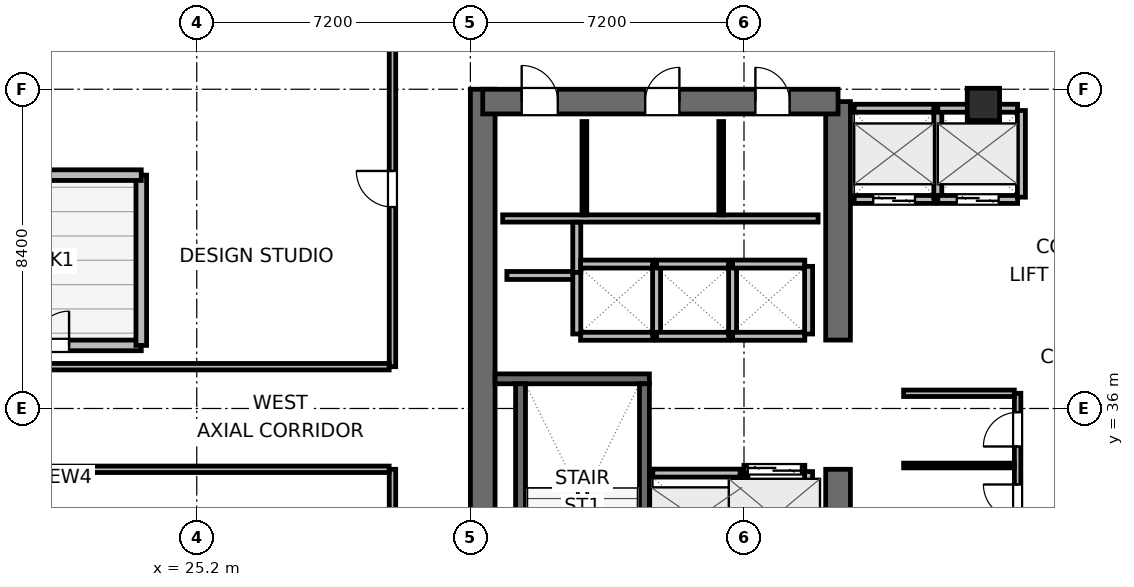
"""IFC4 building model, lengths in metres.
Left out: names, types, materials, properties, quantities, classifications, styles, units other than length and angle.
Written with IfcOpenShell. Run it as: python <this file> out.ifc"""

import sys

from ifc_helpers import new_model, si_unit, direction, frame, frame_2d, origin, origin_2d, place, context, subcontext, project, spatial, rectangle, extrude, element, fill, save


model = new_model("IFC4")
c1 = context("Model", 3, precision=1e-05, world=origin(), true_north=direction((0.0, 1.0)))
c2 = subcontext(c1, "Body", "Model", "MODEL_VIEW")
j1 = project(units=[si_unit("LENGTHUNIT", "METRE"), si_unit("PLANEANGLEUNIT", "RADIAN")], contexts=[c1])
p1 = place(None, origin())
s1 = spatial("IfcSite", under=j1, at=p1, CompositionType="ELEMENT")
p2 = place(p1, origin())
s2 = spatial("IfcBuilding", under=s1, at=p2, CompositionType="ELEMENT")
p3 = place(p2, frame((0.0, 0.0, 181.8)))
s3 = spatial("IfcBuildingStorey", under=s2, at=p3, CompositionType="ELEMENT", Elevation=181.8)
p4 = place(p3, frame((32.725, 27.6, 0.0), z_axis=(0.0, 0.0, 1.0), x_axis=(0.0, 1.0, 0.0)))
e1 = element("IfcWall", 1, at=p4, inside=s3, PredefinedType="SHEAR", context=c2, shape_type="SweptSolid", body=[
    extrude(rectangle(XDim=16.8, YDim=0.65, at=frame_2d((8.4, 0.0))), origin(), (0.0, 0.0, 1.0), 4.5),
])
p5 = place(p3, frame((42.075, 27.925, 0.0), z_axis=(0.0, 0.0, 1.0), x_axis=(0.0, 1.0, 0.0)))
e2 = element("IfcWall", 2, at=p5, inside=s3, PredefinedType="SHEAR", context=c2, shape_type="SweptSolid", body=[
    extrude(rectangle(XDim=6.475, YDim=0.65, at=frame_2d((3.237, 0.0))), origin(), (0.0, 0.0, 1.0), 4.5),
])
p6 = place(p3, frame((42.075, 37.8, 0.0), z_axis=(0.0, 0.0, 1.0), x_axis=(0.0, 1.0, 0.0)))
e3 = element("IfcWall", 3, at=p6, inside=s3, PredefinedType="SHEAR", context=c2, shape_type="SweptSolid", body=[
    extrude(rectangle(XDim=6.275, YDim=0.65, at=frame_2d((3.137, 0.0))), origin(), (0.0, 0.0, 1.0), 4.5),
])
p7 = place(p3, frame((32.725, 44.075, 0.0), z_axis=(0.0, 0.0, 1.0), x_axis=(1.0, 0.0, 0.0)))
e4 = element("IfcWall", 4, at=p7, inside=s3, PredefinedType="SHEAR", context=c2, shape_type="SweptSolid", body=[
    extrude(rectangle(XDim=9.35, YDim=0.65, at=frame_2d((4.675, 0.0))), origin(), (0.0, 0.0, 1.0), 4.5),
])
p8 = place(p7, frame((1.025, 0.0, 0.0)))
e5 = element("IfcOpeningElement", 5, at=p8, cuts=e4, PredefinedType="OPENING", context=c2, shape_type="SweptSolid", body=[
    extrude(rectangle(XDim=0.95, YDim=2.04, at=frame_2d((0.475, 1.02))), frame((0.0, 0.335, 0.0), z_axis=(0.0, -1.0, 0.0), x_axis=(1.0, 0.0, 0.0)), (0.0, 0.0, 1.0), 0.67),
])
p9 = place(p7, frame((4.275, 0.0, 0.0)))
e6 = element("IfcOpeningElement", 6, at=p9, cuts=e4, PredefinedType="OPENING", context=c2, shape_type="SweptSolid", body=[
    extrude(rectangle(XDim=0.9, YDim=2.02, at=frame_2d((0.45, 1.01))), frame((0.0, 0.335, 0.0), z_axis=(0.0, -1.0, 0.0), x_axis=(1.0, 0.0, 0.0)), (0.0, 0.0, 1.0), 0.67),
])
p10 = place(p7, frame((7.175, 0.0, 0.0)))
e7 = element("IfcOpeningElement", 7, at=p10, cuts=e4, PredefinedType="OPENING", context=c2, shape_type="SweptSolid", body=[
    extrude(rectangle(XDim=0.9, YDim=2.02, at=frame_2d((0.45, 1.01))), frame((0.0, 0.335, 0.0), z_axis=(0.0, -1.0, 0.0), x_axis=(1.0, 0.0, 0.0)), (0.0, 0.0, 1.0), 0.67),
])
p11 = place(p3, frame((33.05, 36.78, 0.0), z_axis=(0.0, 0.0, 1.0), x_axis=(1.0, 0.0, 0.0)))
e8 = element("IfcWall", 8, at=p11, inside=s3, PredefinedType="SHEAR", context=c2, shape_type="SweptSolid", body=[
    extrude(rectangle(XDim=4.06, YDim=0.26, at=frame_2d((2.03, 0.0))), origin(), (0.0, 0.0, 1.0), 4.5),
])
p12 = place(p3, frame((33.72, 29.05, 0.0), z_axis=(0.0, 0.0, 1.0), x_axis=(0.0, 1.0, 0.0)))
e9 = element("IfcWall", 9, at=p12, inside=s3, PredefinedType="SHEAR", context=c2, shape_type="SweptSolid", body=[
    extrude(rectangle(XDim=7.6, YDim=0.26, at=frame_2d((3.8, 0.0))), origin(), (0.0, 0.0, 1.0), 4.5),
])
p13 = place(p3, frame((36.98, 29.05, 0.0), z_axis=(0.0, 0.0, 1.0), x_axis=(0.0, 1.0, 0.0)))
e10 = element("IfcWall", 10, at=p13, inside=s3, PredefinedType="SHEAR", context=c2, shape_type="SweptSolid", body=[
    extrude(rectangle(XDim=7.6, YDim=0.26, at=frame_2d((3.8, 0.0))), origin(), (0.0, 0.0, 1.0), 4.5),
])
p14 = place(p13, frame((0.3, 0.0, 0.0)))
e11 = element("IfcOpeningElement", 11, at=p14, cuts=e10, PredefinedType="OPENING", context=c2, shape_type="SweptSolid", body=[
    extrude(rectangle(XDim=1.0, YDim=2.04, at=frame_2d((0.5, 1.02))), frame((0.0, 0.14, 0.0), z_axis=(0.0, -1.0, 0.0), x_axis=(1.0, 0.0, 0.0)), (0.0, 0.0, 1.0), 0.28),
])
p15 = place(p3, frame((45.9, 44.0, 0.0), z_axis=(0.0, 0.0, 1.0), x_axis=(1.0, 0.0, 0.0)))
e12 = element("IfcColumn", 12, at=p15, inside=s3, PredefinedType="COLUMN", context=c2, shape_type="SweptSolid", body=[
    extrude(rectangle(XDim=0.85, YDim=0.85, at=origin_2d()), origin(), (0.0, 0.0, 1.0), 4.5),
])
p16 = place(p3, frame((18.14, 37.66, 0.0), z_axis=(0.0, 0.0, 1.0), x_axis=(1.0, 0.0, 0.0)))
e13 = element("IfcWall", 13, at=p16, inside=s3, PredefinedType="SOLIDWALL", context=c2, shape_type="SweptSolid", body=[
    extrude(rectangle(XDim=5.6, YDim=0.28, at=frame_2d((2.8, 0.0))), origin(), (0.0, 0.0, 1.0), 3.716),
])
p17 = place(p16, frame((1.9, 0.0, 0.0)))
e14 = element("IfcOpeningElement", 14, at=p17, cuts=e13, PredefinedType="OPENING", context=c2, shape_type="SweptSolid", body=[
    extrude(rectangle(XDim=1.8, YDim=2.1, at=frame_2d((0.9, 1.05))), frame((0.0, 0.15, 0.0), z_axis=(0.0, -1.0, 0.0), x_axis=(1.0, 0.0, 0.0)), (0.0, 0.0, 1.0), 0.3),
])
p18 = place(p3, frame((23.74, 37.66, 0.0), z_axis=(0.0, 0.0, 1.0), x_axis=(0.0, 1.0, 0.0)))
e15 = element("IfcWall", 15, at=p18, inside=s3, PredefinedType="SOLIDWALL", context=c2, shape_type="SweptSolid", body=[
    extrude(rectangle(XDim=4.48, YDim=0.28, at=frame_2d((2.24, 0.0))), origin(), (0.0, 0.0, 1.0), 3.848),
])
p19 = place(p3, frame((23.74, 42.14, 0.0), z_axis=(0.0, 0.0, 1.0), x_axis=(-1.0, 0.0, 0.0)))
e16 = element("IfcWall", 16, at=p19, inside=s3, PredefinedType="SOLIDWALL", context=c2, shape_type="SweptSolid", body=[
    extrude(rectangle(XDim=5.6, YDim=0.28, at=frame_2d((2.8, 0.0))), origin(), (0.0, 0.0, 1.0), 3.716),
])
p20 = place(p3, frame((33.25, 41.0, 0.0), z_axis=(0.0, 0.0, 1.0), x_axis=(1.0, 0.0, 0.0)))
e17 = element("IfcWall", 17, at=p20, inside=s3, PredefinedType="PLUMBINGWALL", context=c2, shape_type="SweptSolid", body=[
    extrude(rectangle(XDim=8.3, YDim=0.19, at=frame_2d((4.15, 0.0))), origin(), (0.0, 0.0, 1.0), 4.28),
])
for number, where, z_axis, x_axis in (
    (18, (35.4, 41.095, 0.0), (0.0, 0.0, 1.0), (0.0, 1.0, 0.0)),
    (19, (39.0, 41.095, 0.0), (0.0, 0.0, 1.0), (0.0, 1.0, 0.0)),
):
    element("IfcWall", number, at=place(p3, frame(where, z_axis=z_axis, x_axis=x_axis)), inside=s3, PredefinedType="PARTITIONING", context=c2, shape_type="SweptSolid", body=[
        extrude(rectangle(XDim=2.455, YDim=0.125, at=frame_2d((1.228, 0.0))), origin(), (0.0, 0.0, 1.0), 4.28),
    ])
p21 = place(p3, frame((33.36, 39.5, 0.0), z_axis=(0.0, 0.0, 1.0), x_axis=(1.0, 0.0, 0.0)))
e20 = element("IfcWall", 20, at=p21, inside=s3, PredefinedType="PARTITIONING", context=c2, shape_type="SweptSolid", body=[
    extrude(rectangle(XDim=1.86, YDim=0.21, at=frame_2d((0.93, 0.0))), origin(), (0.0, 0.0, 1.0), 4.28),
])
p22 = place(p3, frame((35.2, 39.58, 0.0), z_axis=(0.0, 0.0, 1.0), x_axis=(0.0, 1.0, 0.0)))
e21 = element("IfcWall", 21, at=p22, inside=s3, PredefinedType="PARTITIONING", context=c2, shape_type="SweptSolid", body=[
    extrude(rectangle(XDim=1.32, YDim=0.21, at=frame_2d((0.66, 0.0))), origin(), (0.0, 0.0, 1.0), 4.28),
])
p23 = place(p3, frame((37.2, 34.3, 0.0), z_axis=(0.0, 0.0, 1.0), x_axis=(1.0, 0.0, 0.0)))
e22 = element("IfcWall", 22, at=p23, inside=s3, PredefinedType="PARTITIONING", context=c2, shape_type="SweptSolid", body=[
    extrude(rectangle(XDim=2.3, YDim=0.21, at=frame_2d((1.15, 0.0))), origin(), (0.0, 0.0, 1.0), 4.28),
])
p24 = place(p3, frame((39.6, 31.96, 0.0), z_axis=(0.0, 0.0, 1.0), x_axis=(0.0, 1.0, 0.0)))
e23 = element("IfcWall", 23, at=p24, inside=s3, PredefinedType="PARTITIONING", context=c2, shape_type="SweptSolid", body=[
    extrude(rectangle(XDim=2.28, YDim=0.21, at=frame_2d((1.14, 0.0))), origin(), (0.0, 0.0, 1.0), 4.28),
])
p25 = place(p3, frame((39.6, 34.4, 0.0), z_axis=(0.0, 0.0, 1.0), x_axis=(1.0, 0.0, 0.0)))
e24 = element("IfcWall", 24, at=p25, inside=s3, PredefinedType="PARTITIONING", context=c2, shape_type="SweptSolid", body=[
    extrude(rectangle(XDim=1.6, YDim=0.21, at=frame_2d((0.8, 0.0))), origin(), (0.0, 0.0, 1.0), 4.28),
])
p26 = place(p25, frame((0.1, 0.0, 0.0)))
e25 = element("IfcOpeningElement", 25, at=p26, cuts=e24, PredefinedType="OPENING", context=c2, shape_type="SweptSolid", body=[
    extrude(rectangle(XDim=1.4, YDim=2.06, at=frame_2d((0.7, 1.03))), frame((0.0, 0.115, 0.0), z_axis=(0.0, -1.0, 0.0), x_axis=(1.0, 0.0, 0.0)), (0.0, 0.0, 1.0), 0.23),
])
p27 = place(p3, frame((41.3, 31.96, 0.0), z_axis=(0.0, 0.0, 1.0), x_axis=(0.0, 1.0, 0.0)))
e26 = element("IfcWall", 26, at=p27, inside=s3, PredefinedType="PARTITIONING", context=c2, shape_type="SweptSolid", body=[
    extrude(rectangle(XDim=2.38, YDim=0.21, at=frame_2d((1.19, 0.0))), origin(), (0.0, 0.0, 1.0), 4.28),
])
p28 = place(p3, frame((42.5, 41.5, 0.0), z_axis=(0.0, 0.0, 1.0), x_axis=(1.0, 0.0, 0.0)))
e27 = element("IfcWall", 27, at=p28, inside=s3, PredefinedType="PARTITIONING", context=c2, shape_type="SweptSolid", body=[
    extrude(rectangle(XDim=2.1, YDim=0.21, at=frame_2d((1.05, 0.0))), origin(), (0.0, 0.0, 1.0), 4.28),
])
p29 = place(p28, frame((0.5, 0.0, 0.0)))
e28 = element("IfcOpeningElement", 28, at=p29, cuts=e27, PredefinedType="OPENING", context=c2, shape_type="SweptSolid", body=[
    extrude(rectangle(XDim=1.1, YDim=2.04, at=frame_2d((0.55, 1.02))), frame((0.0, 0.115, 0.0), z_axis=(0.0, -1.0, 0.0), x_axis=(1.0, 0.0, 0.0)), (0.0, 0.0, 1.0), 0.23),
])
p30 = place(p3, frame((42.5, 43.9, 0.0), z_axis=(0.0, 0.0, 1.0), x_axis=(1.0, 0.0, 0.0)))
e29 = element("IfcWall", 29, at=p30, inside=s3, PredefinedType="PARTITIONING", context=c2, shape_type="SweptSolid", body=[
    extrude(rectangle(XDim=2.1, YDim=0.21, at=frame_2d((1.05, 0.0))), origin(), (0.0, 0.0, 1.0), 3.365),
])
p31 = place(p3, frame((44.7, 41.56, 0.0), z_axis=(0.0, 0.0, 1.0), x_axis=(0.0, 1.0, 0.0)))
e30 = element("IfcWall", 30, at=p31, inside=s3, PredefinedType="PARTITIONING", context=c2, shape_type="SweptSolid", body=[
    extrude(rectangle(XDim=2.28, YDim=0.21, at=frame_2d((1.14, 0.0))), origin(), (0.0, 0.0, 1.0), 4.28),
])
p32 = place(p3, frame((44.7, 41.5, 0.0), z_axis=(0.0, 0.0, 1.0), x_axis=(1.0, 0.0, 0.0)))
e31 = element("IfcWall", 31, at=p32, inside=s3, PredefinedType="PARTITIONING", context=c2, shape_type="SweptSolid", body=[
    extrude(rectangle(XDim=2.1, YDim=0.21, at=frame_2d((1.05, 0.0))), origin(), (0.0, 0.0, 1.0), 4.28),
])
p33 = place(p32, frame((0.5, 0.0, 0.0)))
e32 = element("IfcOpeningElement", 32, at=p33, cuts=e31, PredefinedType="OPENING", context=c2, shape_type="SweptSolid", body=[
    extrude(rectangle(XDim=1.1, YDim=2.04, at=frame_2d((0.55, 1.02))), frame((0.0, 0.115, 0.0), z_axis=(0.0, -1.0, 0.0), x_axis=(1.0, 0.0, 0.0)), (0.0, 0.0, 1.0), 0.23),
])
p34 = place(p3, frame((44.7, 43.9, 0.0), z_axis=(0.0, 0.0, 1.0), x_axis=(1.0, 0.0, 0.0)))
e33 = element("IfcWall", 33, at=p34, inside=s3, PredefinedType="PARTITIONING", context=c2, shape_type="SweptSolid", body=[
    extrude(rectangle(XDim=2.1, YDim=0.21, at=frame_2d((1.05, 0.0))), origin(), (0.0, 0.0, 1.0), 3.365),
])
p35 = place(p3, frame((46.9, 41.56, 0.0), z_axis=(0.0, 0.0, 1.0), x_axis=(0.0, 1.0, 0.0)))
e34 = element("IfcWall", 34, at=p35, inside=s3, PredefinedType="PARTITIONING", context=c2, shape_type="SweptSolid", body=[
    extrude(rectangle(XDim=2.28, YDim=0.21, at=frame_2d((1.14, 0.0))), origin(), (0.0, 0.0, 1.0), 4.28),
])
for number, where, z_axis, x_axis in (
    (35, (35.3, 37.9, 0.0), (0.0, 0.0, 1.0), (1.0, 0.0, 0.0)),
    (36, (35.3, 39.8, 0.0), (0.0, 0.0, 1.0), (1.0, 0.0, 0.0)),
):
    element("IfcWall", number, at=place(p3, frame(where, z_axis=z_axis, x_axis=x_axis)), inside=s3, PredefinedType="PARTITIONING", context=c2, shape_type="SweptSolid", body=[
        extrude(rectangle(XDim=1.9, YDim=0.21, at=frame_2d((0.95, 0.0))), origin(), (0.0, 0.0, 1.0), 4.28),
    ])
p36 = place(p3, frame((35.2, 37.96, 0.0), z_axis=(0.0, 0.0, 1.0), x_axis=(0.0, 1.0, 0.0)))
e37 = element("IfcWall", 37, at=p36, inside=s3, PredefinedType="PARTITIONING", context=c2, shape_type="SweptSolid", body=[
    extrude(rectangle(XDim=1.62, YDim=0.21, at=frame_2d((0.81, 0.0))), origin(), (0.0, 0.0, 1.0), 4.28),
])
p37 = place(p3, frame((37.3, 37.96, 0.0), z_axis=(0.0, 0.0, 1.0), x_axis=(0.0, 1.0, 0.0)))
e38 = element("IfcWall", 38, at=p37, inside=s3, PredefinedType="PARTITIONING", context=c2, shape_type="SweptSolid", body=[
    extrude(rectangle(XDim=1.78, YDim=0.21, at=frame_2d((0.89, 0.0))), origin(), (0.0, 0.0, 1.0), 4.28),
])
for number, where, z_axis, x_axis in (
    (39, (37.3, 37.9, 0.0), (0.0, 0.0, 1.0), (1.0, 0.0, 0.0)),
    (40, (37.3, 39.8, 0.0), (0.0, 0.0, 1.0), (1.0, 0.0, 0.0)),
):
    element("IfcWall", number, at=place(p3, frame(where, z_axis=z_axis, x_axis=x_axis)), inside=s3, PredefinedType="PARTITIONING", context=c2, shape_type="SweptSolid", body=[
        extrude(rectangle(XDim=1.9, YDim=0.21, at=frame_2d((0.95, 0.0))), origin(), (0.0, 0.0, 1.0), 4.28),
    ])
p38 = place(p3, frame((39.3, 37.96, 0.0), z_axis=(0.0, 0.0, 1.0), x_axis=(0.0, 1.0, 0.0)))
e41 = element("IfcWall", 41, at=p38, inside=s3, PredefinedType="PARTITIONING", context=c2, shape_type="SweptSolid", body=[
    extrude(rectangle(XDim=1.78, YDim=0.21, at=frame_2d((0.89, 0.0))), origin(), (0.0, 0.0, 1.0), 4.28),
])
for number, where, z_axis, x_axis in (
    (42, (39.3, 37.9, 0.0), (0.0, 0.0, 1.0), (1.0, 0.0, 0.0)),
    (43, (39.3, 39.8, 0.0), (0.0, 0.0, 1.0), (1.0, 0.0, 0.0)),
):
    element("IfcWall", number, at=place(p3, frame(where, z_axis=z_axis, x_axis=x_axis)), inside=s3, PredefinedType="PARTITIONING", context=c2, shape_type="SweptSolid", body=[
        extrude(rectangle(XDim=1.9, YDim=0.21, at=frame_2d((0.95, 0.0))), origin(), (0.0, 0.0, 1.0), 4.28),
    ])
p39 = place(p3, frame((41.3, 37.96, 0.0), z_axis=(0.0, 0.0, 1.0), x_axis=(0.0, 1.0, 0.0)))
e44 = element("IfcWall", 44, at=p39, inside=s3, PredefinedType="PARTITIONING", context=c2, shape_type="SweptSolid", body=[
    extrude(rectangle(XDim=1.78, YDim=0.21, at=frame_2d((0.89, 0.0))), origin(), (0.0, 0.0, 1.0), 4.28),
])
p40 = place(p3, frame((46.8, 32.6, 0.0), z_axis=(0.0, 0.0, 1.0), x_axis=(0.0, 1.0, 0.0)))
e45 = element("IfcWall", 45, at=p40, inside=s3, PredefinedType="PARTITIONING", context=c2, shape_type="SweptSolid", body=[
    extrude(rectangle(XDim=3.8, YDim=0.17, at=frame_2d((1.9, 0.0))), origin(), (0.0, 0.0, 1.0), 4.28),
])
p41 = place(p40, frame((0.5, 0.0, 0.0)))
e46 = element("IfcOpeningElement", 46, at=p41, cuts=e45, PredefinedType="OPENING", context=c2, shape_type="SweptSolid", body=[
    extrude(rectangle(XDim=0.9, YDim=2.02, at=frame_2d((0.45, 1.01))), frame((0.0, 0.095, 0.0), z_axis=(0.0, -1.0, 0.0), x_axis=(1.0, 0.0, 0.0)), (0.0, 0.0, 1.0), 0.19),
])
p42 = place(p40, frame((2.4, 0.0, 0.0)))
e47 = element("IfcOpeningElement", 47, at=p42, cuts=e45, PredefinedType="OPENING", context=c2, shape_type="SweptSolid", body=[
    extrude(rectangle(XDim=0.9, YDim=2.02, at=frame_2d((0.45, 1.01))), frame((0.0, 0.095, 0.0), z_axis=(0.0, -1.0, 0.0), x_axis=(1.0, 0.0, 0.0)), (0.0, 0.0, 1.0), 0.19),
])
p43 = place(p3, frame((43.8, 36.4, 0.0), z_axis=(0.0, 0.0, 1.0), x_axis=(1.0, 0.0, 0.0)))
e48 = element("IfcWall", 48, at=p43, inside=s3, PredefinedType="PARTITIONING", context=c2, shape_type="SweptSolid", body=[
    extrude(rectangle(XDim=2.913, YDim=0.17, at=frame_2d((1.457, 0.0))), origin(), (0.0, 0.0, 1.0), 4.28),
])
p44 = place(p3, frame((43.8, 34.5, 0.0), z_axis=(0.0, 0.0, 1.0), x_axis=(1.0, 0.0, 0.0)))
e49 = element("IfcWall", 49, at=p44, inside=s3, PredefinedType="PARTITIONING", context=c2, shape_type="SweptSolid", body=[
    extrude(rectangle(XDim=2.913, YDim=0.125, at=frame_2d((1.457, 0.0))), origin(), (0.0, 0.0, 1.0), 4.28),
])
p45 = place(p3, frame((30.35, 25.637, 0.0), z_axis=(0.0, 0.0, 1.0), x_axis=(0.0, 1.0, 0.0)))
e50 = element("IfcWall", 50, at=p45, inside=s3, PredefinedType="PARTITIONING", context=c2, shape_type="SweptSolid", body=[
    extrude(rectangle(XDim=8.763, YDim=0.17, at=frame_2d((4.381, 0.0))), origin(), (0.0, 0.0, 1.0), 4.28),
])
p46 = place(p45, frame((3.863, 0.0, 0.0)))
e51 = element("IfcOpeningElement", 51, at=p46, cuts=e50, PredefinedType="OPENING", context=c2, shape_type="SweptSolid", body=[
    extrude(rectangle(XDim=0.95, YDim=2.04, at=frame_2d((0.475, 1.02))), frame((0.0, 0.095, 0.0), z_axis=(0.0, -1.0, 0.0), x_axis=(1.0, 0.0, 0.0)), (0.0, 0.0, 1.0), 0.19),
])
p47 = place(p3, frame((30.35, 37.1, 0.0), z_axis=(0.0, 0.0, 1.0), x_axis=(0.0, 1.0, 0.0)))
e52 = element("IfcWall", 52, at=p47, inside=s3, PredefinedType="PARTITIONING", context=c2, shape_type="SweptSolid", body=[
    extrude(rectangle(XDim=9.263, YDim=0.17, at=frame_2d((4.631, 0.0))), origin(), (0.0, 0.0, 1.0), 4.28),
])
p48 = place(p47, frame((4.2, 0.0, 0.0)))
e53 = element("IfcOpeningElement", 53, at=p48, cuts=e52, PredefinedType="OPENING", context=c2, shape_type="SweptSolid", body=[
    extrude(rectangle(XDim=0.95, YDim=2.04, at=frame_2d((0.475, 1.02))), frame((0.0, 0.095, 0.0), z_axis=(0.0, -1.0, 0.0), x_axis=(1.0, 0.0, 0.0)), (0.0, 0.0, 1.0), 0.19),
])
p49 = place(p3, frame((20.24, 34.4, 0.0), z_axis=(0.0, 0.0, 1.0), x_axis=(1.0, 0.0, 0.0)))
e54 = element("IfcWall", 54, at=p49, inside=s3, PredefinedType="PARTITIONING", context=c2, shape_type="SweptSolid", body=[
    extrude(rectangle(XDim=10.023, YDim=0.17, at=frame_2d((5.011, 0.0))), origin(), (0.0, 0.0, 1.0), 4.28),
])
p50 = place(p3, frame((18.275, 37.1, 0.0), z_axis=(0.0, 0.0, 1.0), x_axis=(1.0, 0.0, 0.0)))
e55 = element("IfcWall", 55, at=p50, inside=s3, PredefinedType="PARTITIONING", context=c2, shape_type="SweptSolid", body=[
    extrude(rectangle(XDim=11.988, YDim=0.17, at=frame_2d((5.994, 0.0))), origin(), (0.0, 0.0, 1.0), 4.28),
])
p51 = place(p17, origin())
e56 = element("IfcDoor", 56, at=p51, inside=s3, OperationType="DOUBLE_DOOR_SINGLE_SWING", PredefinedType="DOOR", context=c2, shape_type="SweptSolid", body=[
    extrude(rectangle(XDim=1.8, YDim=2.1, at=frame_2d((0.9, 1.05))), frame((0.0, 0.025, 0.0), z_axis=(0.0, -1.0, 0.0), x_axis=(1.0, 0.0, 0.0)), (0.0, 0.0, 1.0), 0.05),
])
fill(e14, e56)
p52 = place(p26, origin())
e57 = element("IfcDoor", 57, at=p52, inside=s3, OperationType="DOUBLE_DOOR_SLIDING", PredefinedType="DOOR", context=c2, shape_type="SweptSolid", body=[
    extrude(rectangle(XDim=1.4, YDim=2.06, at=frame_2d((0.7, 1.03))), frame((0.0, 0.025, 0.0), z_axis=(0.0, -1.0, 0.0), x_axis=(1.0, 0.0, 0.0)), (0.0, 0.0, 1.0), 0.05),
])
fill(e25, e57)
p53 = place(p29, origin())
e58 = element("IfcDoor", 58, at=p53, inside=s3, OperationType="DOUBLE_DOOR_SLIDING", PredefinedType="DOOR", context=c2, shape_type="SweptSolid", body=[
    extrude(rectangle(XDim=1.1, YDim=2.04, at=frame_2d((0.55, 1.02))), frame((0.0, 0.025, 0.0), z_axis=(0.0, -1.0, 0.0), x_axis=(1.0, 0.0, 0.0)), (0.0, 0.0, 1.0), 0.05),
])
fill(e28, e58)
p54 = place(p33, origin())
e59 = element("IfcDoor", 59, at=p54, inside=s3, OperationType="DOUBLE_DOOR_SLIDING", PredefinedType="DOOR", context=c2, shape_type="SweptSolid", body=[
    extrude(rectangle(XDim=1.1, YDim=2.04, at=frame_2d((0.55, 1.02))), frame((0.0, 0.025, 0.0), z_axis=(0.0, -1.0, 0.0), x_axis=(1.0, 0.0, 0.0)), (0.0, 0.0, 1.0), 0.05),
])
fill(e32, e59)
p55 = place(p8, origin())
e60 = element("IfcDoor", 60, at=p55, inside=s3, OperationType="SINGLE_SWING_LEFT", PredefinedType="DOOR", context=c2, shape_type="SweptSolid", body=[
    extrude(rectangle(XDim=0.95, YDim=2.04, at=frame_2d((0.475, 1.02))), frame((0.0, 0.025, 0.0), z_axis=(0.0, -1.0, 0.0), x_axis=(1.0, 0.0, 0.0)), (0.0, 0.0, 1.0), 0.05),
])
fill(e5, e60)
p56 = place(p9, origin())
e61 = element("IfcDoor", 61, at=p56, inside=s3, OperationType="SINGLE_SWING_RIGHT", PredefinedType="DOOR", context=c2, shape_type="SweptSolid", body=[
    extrude(rectangle(XDim=0.9, YDim=2.02, at=frame_2d((0.45, 1.01))), frame((0.0, 0.025, 0.0), z_axis=(0.0, -1.0, 0.0), x_axis=(1.0, 0.0, 0.0)), (0.0, 0.0, 1.0), 0.05),
])
fill(e6, e61)
p57 = place(p10, origin())
e62 = element("IfcDoor", 62, at=p57, inside=s3, OperationType="SINGLE_SWING_LEFT", PredefinedType="DOOR", context=c2, shape_type="SweptSolid", body=[
    extrude(rectangle(XDim=0.9, YDim=2.02, at=frame_2d((0.45, 1.01))), frame((0.0, 0.025, 0.0), z_axis=(0.0, -1.0, 0.0), x_axis=(1.0, 0.0, 0.0)), (0.0, 0.0, 1.0), 0.05),
])
fill(e7, e62)
p58 = place(p41, origin())
e63 = element("IfcDoor", 63, at=p58, inside=s3, OperationType="SINGLE_SWING_RIGHT", PredefinedType="DOOR", context=c2, shape_type="SweptSolid", body=[
    extrude(rectangle(XDim=0.9, YDim=2.02, at=frame_2d((0.45, 1.01))), frame((0.0, 0.025, 0.0), z_axis=(0.0, -1.0, 0.0), x_axis=(1.0, 0.0, 0.0)), (0.0, 0.0, 1.0), 0.05),
])
fill(e46, e63)
p59 = place(p42, origin())
e64 = element("IfcDoor", 64, at=p59, inside=s3, OperationType="SINGLE_SWING_LEFT", PredefinedType="DOOR", context=c2, shape_type="SweptSolid", body=[
    extrude(rectangle(XDim=0.9, YDim=2.02, at=frame_2d((0.45, 1.01))), frame((0.0, 0.025, 0.0), z_axis=(0.0, -1.0, 0.0), x_axis=(1.0, 0.0, 0.0)), (0.0, 0.0, 1.0), 0.05),
])
fill(e47, e64)
p60 = place(p48, origin())
e65 = element("IfcDoor", 65, at=p60, inside=s3, OperationType="SINGLE_SWING_RIGHT", PredefinedType="DOOR", context=c2, shape_type="SweptSolid", body=[
    extrude(rectangle(XDim=0.95, YDim=2.04, at=frame_2d((0.475, 1.02))), frame((0.0, 0.025, 0.0), z_axis=(0.0, -1.0, 0.0), x_axis=(1.0, 0.0, 0.0)), (0.0, 0.0, 1.0), 0.05),
])
fill(e53, e65)
save(model, sys.argv[1])
